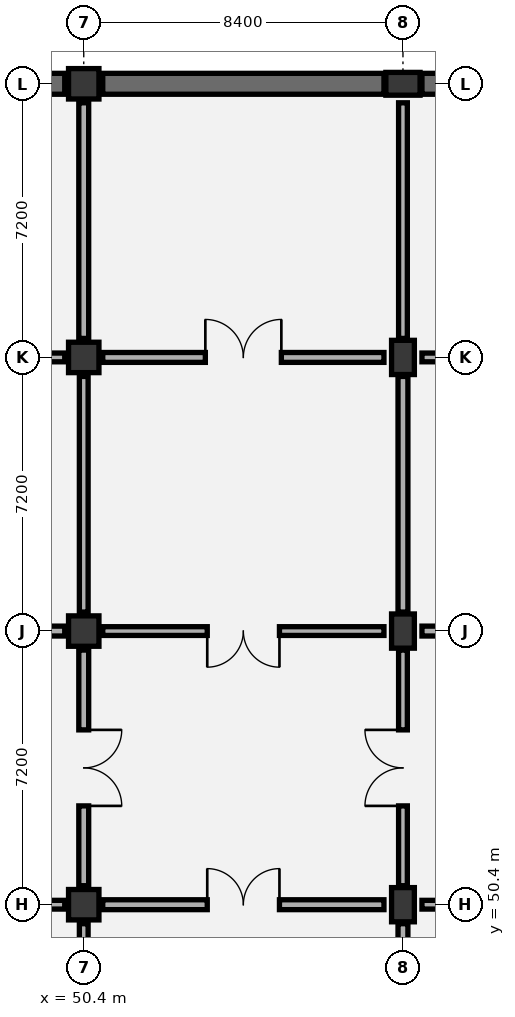
"""IFC4 building model, lengths in metres.
Left out: names, types, materials, properties, quantities, classifications, styles, units other than length and angle.
Written with IfcOpenShell. Run it as: python <this file> out.ifc"""

import sys

from ifc_helpers import new_model, si_unit, direction, frame, frame_2d, origin, origin_2d, place, context, subcontext, project, spatial, rectangle, extrude, element, fill, save


model = new_model("IFC4")
c1 = context("Model", 3, precision=1e-05, world=origin(), true_north=direction((0.0, 1.0)))
c2 = subcontext(c1, "Body", "Model", "MODEL_VIEW")
j1 = project(units=[si_unit("LENGTHUNIT", "METRE"), si_unit("PLANEANGLEUNIT", "RADIAN")], contexts=[c1])
p1 = place(None, origin())
s1 = spatial("IfcSite", under=j1, at=p1, CompositionType="ELEMENT")
p2 = place(p1, origin())
s2 = spatial("IfcBuilding", under=s1, at=p2, CompositionType="ELEMENT")
p3 = place(p2, frame((0.0, 0.0, -9.6)))
s3 = spatial("IfcBuildingStorey", under=s2, at=p3, CompositionType="ELEMENT", Elevation=-9.6)
for number, where, z_axis, x_axis in (
    (1, (50.4, 50.4, 0.0), (0.0, 0.0, 1.0), (1.0, 0.0, 0.0)),
    (2, (50.4, 57.6, 0.0), (0.0, 0.0, 1.0), (1.0, 0.0, 0.0)),
    (3, (50.4, 64.8, 0.0), (0.0, 0.0, 1.0), (1.0, 0.0, 0.0)),
    (4, (50.4, 72.0, 0.0), (0.0, 0.0, 1.0), (1.0, 0.0, 0.0)),
):
    element("IfcColumn", number, at=place(p3, frame(where, z_axis=z_axis, x_axis=x_axis)), inside=s3, PredefinedType="COLUMN", context=c2, shape_type="SweptSolid", body=[
        extrude(rectangle(XDim=0.8, YDim=0.8, at=origin_2d()), origin(), (0.0, 0.0, 1.0), 4.8),
    ])
for number, where, z_axis, x_axis in (
    (5, (58.8, 50.4, 0.0), (0.0, 0.0, 1.0), (1.0, 0.0, 0.0)),
    (6, (58.8, 57.6, 0.0), (0.0, 0.0, 1.0), (1.0, 0.0, 0.0)),
    (7, (58.8, 64.8, 0.0), (0.0, 0.0, 1.0), (1.0, 0.0, 0.0)),
    (8, (58.8, 72.0, 0.0), (0.0, 0.0, 1.0), (0.0, 1.0, 0.0)),
):
    element("IfcColumn", number, at=place(p3, frame(where, z_axis=z_axis, x_axis=x_axis)), inside=s3, PredefinedType="COLUMN", context=c2, shape_type="SweptSolid", body=[
        extrude(rectangle(XDim=0.6, YDim=0.9, at=origin_2d()), origin(), (0.0, 0.0, 1.0), 4.8),
    ])
p4 = place(p3, frame((42.5, 72.0, 0.0), z_axis=(0.0, 0.0, 1.0), x_axis=(1.0, 0.0, 0.0)))
e9 = element("IfcWall", 9, at=p4, inside=s3, PredefinedType="USERDEFINED", context=c2, shape_type="SweptSolid", body=[
    extrude(rectangle(XDim=7.4, YDim=0.55, at=frame_2d((3.7, 0.0))), origin(), (0.0, 0.0, 1.0), 4.4),
])
p5 = place(p3, frame((50.9, 72.0, 0.0), z_axis=(0.0, 0.0, 1.0), x_axis=(1.0, 0.0, 0.0)))
e10 = element("IfcWall", 10, at=p5, inside=s3, PredefinedType="USERDEFINED", context=c2, shape_type="SweptSolid", body=[
    extrude(rectangle(XDim=7.4, YDim=0.55, at=frame_2d((3.7, 0.0))), origin(), (0.0, 0.0, 1.0), 4.4),
])
p6 = place(p3, frame((59.3, 72.0, 0.0), z_axis=(0.0, 0.0, 1.0), x_axis=(1.0, 0.0, 0.0)))
e11 = element("IfcWall", 11, at=p6, inside=s3, PredefinedType="USERDEFINED", context=c2, shape_type="SweptSolid", body=[
    extrude(rectangle(XDim=7.4, YDim=0.55, at=frame_2d((3.7, 0.0))), origin(), (0.0, 0.0, 1.0), 4.4),
])
p7 = place(p3, frame((50.4, 43.7, 0.0), z_axis=(0.0, 0.0, 1.0), x_axis=(0.0, 1.0, 0.0)))
e12 = element("IfcWall", 12, at=p7, inside=s3, PredefinedType="PARTITIONING", context=c2, shape_type="SweptSolid", body=[
    extrude(rectangle(XDim=6.2, YDim=0.23, at=frame_2d((3.1, 0.0))), origin(), (0.0, 0.0, 1.0), 3.595),
])
p8 = place(p3, frame((42.5, 50.4, 0.0), z_axis=(0.0, 0.0, 1.0), x_axis=(1.0, 0.0, 0.0)))
e13 = element("IfcWall", 13, at=p8, inside=s3, PredefinedType="PARTITIONING", context=c2, shape_type="SweptSolid", body=[
    extrude(rectangle(XDim=7.4, YDim=0.23, at=frame_2d((3.7, 0.0))), origin(), (0.0, 0.0, 1.0), 3.495),
])
p9 = place(p8, frame((2.75, 0.0, 0.0)))
e14 = element("IfcOpeningElement", 14, at=p9, cuts=e13, PredefinedType="OPENING", context=c2, shape_type="SweptSolid", body=[
    extrude(rectangle(XDim=1.9, YDim=2.3, at=frame_2d((0.95, 1.15))), frame((0.0, 0.125, 0.0), z_axis=(0.0, -1.0, 0.0), x_axis=(1.0, 0.0, 0.0)), (0.0, 0.0, 1.0), 0.25),
])
p10 = place(p3, frame((50.4, 50.9, 0.0), z_axis=(0.0, 0.0, 1.0), x_axis=(0.0, 1.0, 0.0)))
e15 = element("IfcWall", 15, at=p10, inside=s3, PredefinedType="PARTITIONING", context=c2, shape_type="SweptSolid", body=[
    extrude(rectangle(XDim=6.2, YDim=0.26, at=frame_2d((3.1, 0.0))), origin(), (0.0, 0.0, 1.0), 3.595),
])
p11 = place(p10, frame((2.1, 0.0, 0.0)))
e16 = element("IfcOpeningElement", 16, at=p11, cuts=e15, PredefinedType="OPENING", context=c2, shape_type="SweptSolid", body=[
    extrude(rectangle(XDim=2.0, YDim=2.35, at=frame_2d((1.0, 1.175))), frame((0.0, 0.14, 0.0), z_axis=(0.0, -1.0, 0.0), x_axis=(1.0, 0.0, 0.0)), (0.0, 0.0, 1.0), 0.28),
])
p12 = place(p3, frame((42.5, 57.6, 0.0), z_axis=(0.0, 0.0, 1.0), x_axis=(1.0, 0.0, 0.0)))
e17 = element("IfcWall", 17, at=p12, inside=s3, PredefinedType="PARTITIONING", context=c2, shape_type="SweptSolid", body=[
    extrude(rectangle(XDim=7.4, YDim=0.26, at=frame_2d((3.7, 0.0))), origin(), (0.0, 0.0, 1.0), 3.495),
])
p13 = place(p12, frame((2.75, 0.0, 0.0)))
e18 = element("IfcOpeningElement", 18, at=p13, cuts=e17, PredefinedType="OPENING", context=c2, shape_type="SweptSolid", body=[
    extrude(rectangle(XDim=1.9, YDim=2.3, at=frame_2d((0.95, 1.15))), frame((0.0, 0.14, 0.0), z_axis=(0.0, -1.0, 0.0), x_axis=(1.0, 0.0, 0.0)), (0.0, 0.0, 1.0), 0.28),
])
p14 = place(p3, frame((50.4, 58.1, 0.0), z_axis=(0.0, 0.0, 1.0), x_axis=(0.0, 1.0, 0.0)))
e19 = element("IfcWall", 19, at=p14, inside=s3, PredefinedType="PARTITIONING", context=c2, shape_type="SweptSolid", body=[
    extrude(rectangle(XDim=6.2, YDim=0.23, at=frame_2d((3.1, 0.0))), origin(), (0.0, 0.0, 1.0), 3.595),
])
p15 = place(p3, frame((42.5, 64.8, 0.0), z_axis=(0.0, 0.0, 1.0), x_axis=(1.0, 0.0, 0.0)))
e20 = element("IfcWall", 20, at=p15, inside=s3, PredefinedType="PARTITIONING", context=c2, shape_type="SweptSolid", body=[
    extrude(rectangle(XDim=7.4, YDim=0.23, at=frame_2d((3.7, 0.0))), origin(), (0.0, 0.0, 1.0), 3.495),
])
p16 = place(p15, frame((2.7, 0.0, 0.0)))
e21 = element("IfcOpeningElement", 21, at=p16, cuts=e20, PredefinedType="OPENING", context=c2, shape_type="SweptSolid", body=[
    extrude(rectangle(XDim=2.0, YDim=2.35, at=frame_2d((1.0, 1.175))), frame((0.0, 0.125, 0.0), z_axis=(0.0, -1.0, 0.0), x_axis=(1.0, 0.0, 0.0)), (0.0, 0.0, 1.0), 0.25),
])
for number, where, z_axis, x_axis in (
    (22, (50.4, 65.3, 0.0), (0.0, 0.0, 1.0), (0.0, 1.0, 0.0)),
    (23, (58.8, 43.7, 0.0), (0.0, 0.0, 1.0), (0.0, 1.0, 0.0)),
):
    element("IfcWall", number, at=place(p3, frame(where, z_axis=z_axis, x_axis=x_axis)), inside=s3, PredefinedType="PARTITIONING", context=c2, shape_type="SweptSolid", body=[
        extrude(rectangle(XDim=6.2, YDim=0.26, at=frame_2d((3.1, 0.0))), origin(), (0.0, 0.0, 1.0), 3.595),
    ])
p17 = place(p3, frame((50.9, 50.4, 0.0), z_axis=(0.0, 0.0, 1.0), x_axis=(1.0, 0.0, 0.0)))
e24 = element("IfcWall", 24, at=p17, inside=s3, PredefinedType="PARTITIONING", context=c2, shape_type="SweptSolid", body=[
    extrude(rectangle(XDim=7.4, YDim=0.26, at=frame_2d((3.7, 0.0))), origin(), (0.0, 0.0, 1.0), 3.495),
])
p18 = place(p17, frame((2.75, 0.0, 0.0)))
e25 = element("IfcOpeningElement", 25, at=p18, cuts=e24, PredefinedType="OPENING", context=c2, shape_type="SweptSolid", body=[
    extrude(rectangle(XDim=1.9, YDim=2.3, at=frame_2d((0.95, 1.15))), frame((0.0, 0.14, 0.0), z_axis=(0.0, -1.0, 0.0), x_axis=(1.0, 0.0, 0.0)), (0.0, 0.0, 1.0), 0.28),
])
p19 = place(p3, frame((58.8, 50.9, 0.0), z_axis=(0.0, 0.0, 1.0), x_axis=(0.0, 1.0, 0.0)))
e26 = element("IfcWall", 26, at=p19, inside=s3, PredefinedType="PARTITIONING", context=c2, shape_type="SweptSolid", body=[
    extrude(rectangle(XDim=6.2, YDim=0.23, at=frame_2d((3.1, 0.0))), origin(), (0.0, 0.0, 1.0), 3.595),
])
p20 = place(p19, frame((2.1, 0.0, 0.0)))
e27 = element("IfcOpeningElement", 27, at=p20, cuts=e26, PredefinedType="OPENING", context=c2, shape_type="SweptSolid", body=[
    extrude(rectangle(XDim=2.0, YDim=2.35, at=frame_2d((1.0, 1.175))), frame((0.0, 0.125, 0.0), z_axis=(0.0, -1.0, 0.0), x_axis=(1.0, 0.0, 0.0)), (0.0, 0.0, 1.0), 0.25),
])
p21 = place(p3, frame((50.9, 57.6, 0.0), z_axis=(0.0, 0.0, 1.0), x_axis=(1.0, 0.0, 0.0)))
e28 = element("IfcWall", 28, at=p21, inside=s3, PredefinedType="PARTITIONING", context=c2, shape_type="SweptSolid", body=[
    extrude(rectangle(XDim=7.4, YDim=0.23, at=frame_2d((3.7, 0.0))), origin(), (0.0, 0.0, 1.0), 3.495),
])
p22 = place(p21, frame((2.75, 0.0, 0.0)))
e29 = element("IfcOpeningElement", 29, at=p22, cuts=e28, PredefinedType="OPENING", context=c2, shape_type="SweptSolid", body=[
    extrude(rectangle(XDim=1.9, YDim=2.3, at=frame_2d((0.95, 1.15))), frame((0.0, 0.125, 0.0), z_axis=(0.0, -1.0, 0.0), x_axis=(1.0, 0.0, 0.0)), (0.0, 0.0, 1.0), 0.25),
])
p23 = place(p3, frame((58.8, 58.1, 0.0), z_axis=(0.0, 0.0, 1.0), x_axis=(0.0, 1.0, 0.0)))
e30 = element("IfcWall", 30, at=p23, inside=s3, PredefinedType="PARTITIONING", context=c2, shape_type="SweptSolid", body=[
    extrude(rectangle(XDim=6.2, YDim=0.26, at=frame_2d((3.1, 0.0))), origin(), (0.0, 0.0, 1.0), 3.595),
])
p24 = place(p3, frame((50.9, 64.8, 0.0), z_axis=(0.0, 0.0, 1.0), x_axis=(1.0, 0.0, 0.0)))
e31 = element("IfcWall", 31, at=p24, inside=s3, PredefinedType="PARTITIONING", context=c2, shape_type="SweptSolid", body=[
    extrude(rectangle(XDim=7.4, YDim=0.26, at=frame_2d((3.7, 0.0))), origin(), (0.0, 0.0, 1.0), 3.495),
])
p25 = place(p24, frame((2.7, 0.0, 0.0)))
e32 = element("IfcOpeningElement", 32, at=p25, cuts=e31, PredefinedType="OPENING", context=c2, shape_type="SweptSolid", body=[
    extrude(rectangle(XDim=2.0, YDim=2.35, at=frame_2d((1.0, 1.175))), frame((0.0, 0.14, 0.0), z_axis=(0.0, -1.0, 0.0), x_axis=(1.0, 0.0, 0.0)), (0.0, 0.0, 1.0), 0.28),
])
p26 = place(p3, frame((58.8, 65.3, 0.0), z_axis=(0.0, 0.0, 1.0), x_axis=(0.0, 1.0, 0.0)))
e33 = element("IfcWall", 33, at=p26, inside=s3, PredefinedType="PARTITIONING", context=c2, shape_type="SweptSolid", body=[
    extrude(rectangle(XDim=6.2, YDim=0.23, at=frame_2d((3.1, 0.0))), origin(), (0.0, 0.0, 1.0), 3.595),
])
p27 = place(p3, frame((59.3, 50.4, 0.0), z_axis=(0.0, 0.0, 1.0), x_axis=(1.0, 0.0, 0.0)))
e34 = element("IfcWall", 34, at=p27, inside=s3, PredefinedType="PARTITIONING", context=c2, shape_type="SweptSolid", body=[
    extrude(rectangle(XDim=7.4, YDim=0.23, at=frame_2d((3.7, 0.0))), origin(), (0.0, 0.0, 1.0), 3.495),
])
p28 = place(p27, frame((2.7, 0.0, 0.0)))
e35 = element("IfcOpeningElement", 35, at=p28, cuts=e34, PredefinedType="OPENING", context=c2, shape_type="SweptSolid", body=[
    extrude(rectangle(XDim=2.0, YDim=2.35, at=frame_2d((1.0, 1.175))), frame((0.0, 0.125, 0.0), z_axis=(0.0, -1.0, 0.0), x_axis=(1.0, 0.0, 0.0)), (0.0, 0.0, 1.0), 0.25),
])
p29 = place(p3, frame((59.3, 57.6, 0.0), z_axis=(0.0, 0.0, 1.0), x_axis=(1.0, 0.0, 0.0)))
e36 = element("IfcWall", 36, at=p29, inside=s3, PredefinedType="PARTITIONING", context=c2, shape_type="SweptSolid", body=[
    extrude(rectangle(XDim=7.4, YDim=0.26, at=frame_2d((3.7, 0.0))), origin(), (0.0, 0.0, 1.0), 3.495),
])
p30 = place(p29, frame((2.7, 0.0, 0.0)))
e37 = element("IfcOpeningElement", 37, at=p30, cuts=e36, PredefinedType="OPENING", context=c2, shape_type="SweptSolid", body=[
    extrude(rectangle(XDim=2.0, YDim=2.35, at=frame_2d((1.0, 1.175))), frame((0.0, 0.14, 0.0), z_axis=(0.0, -1.0, 0.0), x_axis=(1.0, 0.0, 0.0)), (0.0, 0.0, 1.0), 0.28),
])
p31 = place(p3, frame((59.3, 64.8, 0.0), z_axis=(0.0, 0.0, 1.0), x_axis=(1.0, 0.0, 0.0)))
e38 = element("IfcWall", 38, at=p31, inside=s3, PredefinedType="PARTITIONING", context=c2, shape_type="SweptSolid", body=[
    extrude(rectangle(XDim=7.4, YDim=0.23, at=frame_2d((3.7, 0.0))), origin(), (0.0, 0.0, 1.0), 3.495),
])
p32 = place(p31, frame((2.75, 0.0, 0.0)))
e39 = element("IfcOpeningElement", 39, at=p32, cuts=e38, PredefinedType="OPENING", context=c2, shape_type="SweptSolid", body=[
    extrude(rectangle(XDim=1.9, YDim=2.3, at=frame_2d((0.95, 1.15))), frame((0.0, 0.125, 0.0), z_axis=(0.0, -1.0, 0.0), x_axis=(1.0, 0.0, 0.0)), (0.0, 0.0, 1.0), 0.25),
])
p33 = place(p11, frame((2.0, 0.0, 0.0), z_axis=(0.0, 0.0, 1.0), x_axis=(-1.0, 0.0, 0.0)))
e40 = element("IfcDoor", 40, at=p33, inside=s3, OperationType="DOUBLE_DOOR_SINGLE_SWING", PredefinedType="DOOR", context=c2, shape_type="SweptSolid", body=[
    extrude(rectangle(XDim=2.0, YDim=2.35, at=frame_2d((1.0, 1.175))), frame((0.0, 0.025, 0.0), z_axis=(0.0, -1.0, 0.0), x_axis=(1.0, 0.0, 0.0)), (0.0, 0.0, 1.0), 0.05),
])
fill(e16, e40)
p34 = place(p18, origin())
e41 = element("IfcDoor", 41, at=p34, inside=s3, OperationType="DOUBLE_DOOR_SINGLE_SWING", PredefinedType="DOOR", context=c2, shape_type="SweptSolid", body=[
    extrude(rectangle(XDim=1.9, YDim=2.3, at=frame_2d((0.95, 1.15))), frame((0.0, 0.025, 0.0), z_axis=(0.0, -1.0, 0.0), x_axis=(1.0, 0.0, 0.0)), (0.0, 0.0, 1.0), 0.05),
])
fill(e25, e41)
p35 = place(p20, origin())
e42 = element("IfcDoor", 42, at=p35, inside=s3, OperationType="DOUBLE_DOOR_SINGLE_SWING", PredefinedType="DOOR", context=c2, shape_type="SweptSolid", body=[
    extrude(rectangle(XDim=2.0, YDim=2.35, at=frame_2d((1.0, 1.175))), frame((0.0, 0.025, 0.0), z_axis=(0.0, -1.0, 0.0), x_axis=(1.0, 0.0, 0.0)), (0.0, 0.0, 1.0), 0.05),
])
fill(e27, e42)
p36 = place(p22, frame((1.9, 0.0, 0.0), z_axis=(0.0, 0.0, 1.0), x_axis=(-1.0, 0.0, 0.0)))
e43 = element("IfcDoor", 43, at=p36, inside=s3, OperationType="DOUBLE_DOOR_SINGLE_SWING", PredefinedType="DOOR", context=c2, shape_type="SweptSolid", body=[
    extrude(rectangle(XDim=1.9, YDim=2.3, at=frame_2d((0.95, 1.15))), frame((0.0, 0.025, 0.0), z_axis=(0.0, -1.0, 0.0), x_axis=(1.0, 0.0, 0.0)), (0.0, 0.0, 1.0), 0.05),
])
fill(e29, e43)
p37 = place(p25, origin())
e44 = element("IfcDoor", 44, at=p37, inside=s3, OperationType="DOUBLE_DOOR_SINGLE_SWING", PredefinedType="DOOR", context=c2, shape_type="SweptSolid", body=[
    extrude(rectangle(XDim=2.0, YDim=2.35, at=frame_2d((1.0, 1.175))), frame((0.0, 0.025, 0.0), z_axis=(0.0, -1.0, 0.0), x_axis=(1.0, 0.0, 0.0)), (0.0, 0.0, 1.0), 0.05),
])
fill(e32, e44)
save(model, sys.argv[1])
